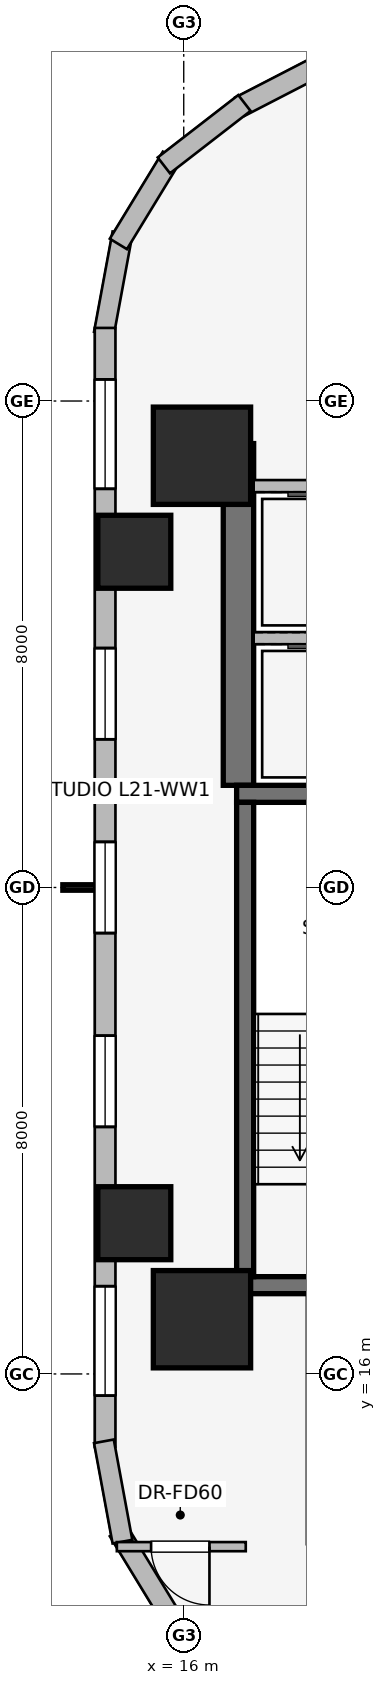
"""IFC4 building model, lengths in metres.
Left out: names, types, materials, properties, quantities, classifications, styles, units other than length and angle.
Written with IfcOpenShell. Run it as: python <this file> out.ifc"""

import sys

from ifc_helpers import new_model, si_unit, direction, frame, frame_2d, origin, origin_2d, place, context, subcontext, project, spatial, rectangle, extrude, element, fill, save


model = new_model("IFC4")
c1 = context("Model", 3, precision=1e-05, world=origin(), true_north=direction((0.0, 1.0)))
c2 = subcontext(c1, "Body", "Model", "MODEL_VIEW")
j1 = project(units=[si_unit("LENGTHUNIT", "METRE"), si_unit("PLANEANGLEUNIT", "RADIAN")], contexts=[c1])
p1 = place(None, origin())
s1 = spatial("IfcSite", under=j1, at=p1, CompositionType="ELEMENT")
p2 = place(p1, origin())
s2 = spatial("IfcBuilding", under=s1, at=p2, CompositionType="ELEMENT")
p3 = place(p2, frame((0.0, 0.0, 81.75)))
s3 = spatial("IfcBuildingStorey", under=s2, at=p3, CompositionType="ELEMENT", Elevation=81.75)
p4 = place(p3, frame((16.9, 25.68, 0.0), z_axis=(0.0, 0.0, 1.0), x_axis=(0.0, 1.0, 0.0)))
e1 = element("IfcWall", 1, at=p4, inside=s3, PredefinedType="SHEAR", context=c2, shape_type="SweptSolid", body=[
    extrude(rectangle(XDim=5.62, YDim=0.5, at=frame_2d((2.81, 0.0))), origin(), (0.0, 0.0, 1.0), 3.65),
])
for number, where, z_axis, x_axis in (
    (2, (16.87, 17.46, 0.0), (0.0, 0.0, 1.0), (1.0, 0.0, 0.0)),
    (3, (20.63, 25.54, 0.0), (0.0, 0.0, 1.0), (-1.0, 0.0, 0.0)),
):
    element("IfcWall", number, at=place(p3, frame(where, z_axis=z_axis, x_axis=x_axis)), inside=s3, PredefinedType="SHEAR", context=c2, shape_type="SweptSolid", body=[
        extrude(rectangle(XDim=3.76, YDim=0.28, at=frame_2d((1.88, 0.0))), origin(), (0.0, 0.0, 1.0), 3.65),
    ])
p5 = place(p3, frame((17.01, 25.4, 0.0), z_axis=(0.0, 0.0, 1.0), x_axis=(0.0, -1.0, 0.0)))
e4 = element("IfcWall", 4, at=p5, inside=s3, PredefinedType="SHEAR", context=c2, shape_type="SweptSolid", body=[
    extrude(rectangle(XDim=7.8, YDim=0.28, at=frame_2d((3.9, 0.0))), origin(), (0.0, 0.0, 1.0), 3.65),
])
for number, where, z_axis, x_axis in (
    (5, (16.3, 16.9, 0.0), (0.0, 0.0, 1.0), (1.0, 0.0, 0.0)),
    (6, (16.3, 31.1, 0.0), (0.0, 0.0, 1.0), (1.0, 0.0, 0.0)),
):
    element("IfcColumn", number, at=place(p3, frame(where, z_axis=z_axis, x_axis=x_axis)), inside=s3, PredefinedType="COLUMN", context=c2, shape_type="SweptSolid", body=[
        extrude(rectangle(XDim=1.6, YDim=1.6, at=origin_2d()), origin(), (0.0, 0.0, 1.0), 3.65),
    ])
for number, where, z_axis, x_axis in (
    (7, (15.187, 29.521, 0.0), (0.0, 0.0, 1.0), (1.0, 0.0, 0.0)),
    (8, (15.187, 18.479, 0.0), (0.0, 0.0, 1.0), (1.0, 0.0, 0.0)),
):
    element("IfcColumn", number, at=place(p3, frame(where, z_axis=z_axis, x_axis=x_axis)), inside=s3, PredefinedType="COLUMN", context=c2, shape_type="SweptSolid", body=[
        extrude(rectangle(XDim=1.2, YDim=1.2, at=origin_2d()), origin(), (0.0, 0.0, 1.0), 3.65),
    ])
p6 = place(p3, frame((16.924, 36.841, 0.0), z_axis=(0.0, 0.0, 1.0), x_axis=(0.888634413993, 0.458616264721, 0.0)))
e9 = element("IfcWall", 9, at=p6, inside=s3, PredefinedType="STANDARD", context=c2, shape_type="SweptSolid", body=[
    extrude(rectangle(XDim=20.531, YDim=0.34, at=frame_2d((10.266, 0.0))), origin(), (0.0, 0.0, 1.0), 2.684),
])
p7 = place(p6, frame((5.197, 0.0, 0.75)))
e10 = element("IfcOpeningElement", 10, at=p7, cuts=e9, PredefinedType="OPENING", context=c2, shape_type="SweptSolid", body=[
    extrude(rectangle(XDim=1.8, YDim=1.5, at=frame_2d((0.9, 0.75))), frame((0.0, 0.18, 0.0), z_axis=(0.0, -1.0, 0.0), x_axis=(1.0, 0.0, 0.0)), (0.0, 0.0, 1.0), 0.36),
])
p8 = place(p6, frame((7.698, 0.0, 0.75)))
e11 = element("IfcOpeningElement", 11, at=p8, cuts=e9, PredefinedType="OPENING", context=c2, shape_type="SweptSolid", body=[
    extrude(rectangle(XDim=1.8, YDim=1.5, at=frame_2d((0.9, 0.75))), frame((0.0, 0.18, 0.0), z_axis=(0.0, -1.0, 0.0), x_axis=(1.0, 0.0, 0.0)), (0.0, 0.0, 1.0), 0.36),
])
p9 = place(p6, frame((11.101, 0.0, 0.75)))
e12 = element("IfcOpeningElement", 12, at=p9, cuts=e9, PredefinedType="OPENING", context=c2, shape_type="SweptSolid", body=[
    extrude(rectangle(XDim=1.5, YDim=1.5, at=frame_2d((0.75, 0.75))), frame((0.0, 0.18, 0.0), z_axis=(0.0, -1.0, 0.0), x_axis=(1.0, 0.0, 0.0)), (0.0, 0.0, 1.0), 0.36),
])
p10 = place(p6, frame((13.657, 0.0, 0.75)))
e13 = element("IfcOpeningElement", 13, at=p10, cuts=e9, PredefinedType="OPENING", context=c2, shape_type="SweptSolid", body=[
    extrude(rectangle(XDim=1.5, YDim=1.5, at=frame_2d((0.75, 0.75))), frame((0.0, 0.18, 0.0), z_axis=(0.0, -1.0, 0.0), x_axis=(1.0, 0.0, 0.0)), (0.0, 0.0, 1.0), 0.36),
])
p11 = place(p6, frame((17.476, 0.0, 0.75)))
e14 = element("IfcOpeningElement", 14, at=p11, cuts=e9, PredefinedType="OPENING", context=c2, shape_type="SweptSolid", body=[
    extrude(rectangle(XDim=1.05, YDim=1.4, at=frame_2d((0.525, 0.7))), frame((0.0, 0.18, 0.0), z_axis=(0.0, -1.0, 0.0), x_axis=(1.0, 0.0, 0.0)), (0.0, 0.0, 1.0), 0.36),
])
p12 = place(p3, frame((14.687, 33.108, 0.0), z_axis=(0.0, 0.0, 1.0), x_axis=(0.181714143354, 0.983351397063, 0.0)))
e15 = element("IfcWall", 15, at=p12, inside=s3, PredefinedType="STANDARD", context=c2, shape_type="SweptSolid", body=[
    extrude(rectangle(XDim=1.678, YDim=0.33, at=frame_2d((0.839, 0.0))), origin(), (0.0, 0.0, 1.0), 3.39),
])
p13 = place(p3, frame((14.925, 34.583, 0.0), z_axis=(0.0, 0.0, 1.0), x_axis=(0.520584129191, 0.853810379671, 0.0)))
e16 = element("IfcWall", 16, at=p13, inside=s3, PredefinedType="STANDARD", context=c2, shape_type="SweptSolid", body=[
    extrude(rectangle(XDim=1.677, YDim=0.33, at=frame_2d((0.838, 0.0))), origin(), (0.0, 0.0, 1.0), 3.39),
])
p14 = place(p3, frame((15.673, 35.875, 0.0), z_axis=(0.0, 0.0, 1.0), x_axis=(0.790691856293, 0.61221433207, 0.0)))
e17 = element("IfcWall", 17, at=p14, inside=s3, PredefinedType="STANDARD", context=c2, shape_type="SweptSolid", body=[
    extrude(rectangle(XDim=1.676, YDim=0.33, at=frame_2d((0.838, 0.0))), origin(), (0.0, 0.0, 1.0), 3.39),
])
p15 = place(p3, frame((14.707, 14.798, 0.0), z_axis=(0.0, 0.0, 1.0), x_axis=(0.0, 1.0, 0.0)))
e18 = element("IfcWall", 18, at=p15, inside=s3, PredefinedType="STANDARD", context=c2, shape_type="SweptSolid", body=[
    extrude(rectangle(XDim=18.404, YDim=0.34, at=frame_2d((9.202, 0.0))), origin(), (0.0, 0.0, 1.0), 2.684),
])
p16 = place(p15, frame((0.845, 0.0, 0.75)))
e19 = element("IfcOpeningElement", 19, at=p16, cuts=e18, PredefinedType="OPENING", context=c2, shape_type="SweptSolid", body=[
    extrude(rectangle(XDim=1.8, YDim=1.5, at=frame_2d((0.9, 0.75))), frame((0.0, 0.18, 0.0), z_axis=(0.0, -1.0, 0.0), x_axis=(1.0, 0.0, 0.0)), (0.0, 0.0, 1.0), 0.36),
])
p17 = place(p15, frame((5.265, 0.0, 0.75)))
e20 = element("IfcOpeningElement", 20, at=p17, cuts=e18, PredefinedType="OPENING", context=c2, shape_type="SweptSolid", body=[
    extrude(rectangle(XDim=1.5, YDim=1.5, at=frame_2d((0.75, 0.75))), frame((0.0, 0.18, 0.0), z_axis=(0.0, -1.0, 0.0), x_axis=(1.0, 0.0, 0.0)), (0.0, 0.0, 1.0), 0.36),
])
p18 = place(p15, frame((8.452, 0.0, 0.75)))
e21 = element("IfcOpeningElement", 21, at=p18, cuts=e18, PredefinedType="OPENING", context=c2, shape_type="SweptSolid", body=[
    extrude(rectangle(XDim=1.5, YDim=1.5, at=frame_2d((0.75, 0.75))), frame((0.0, 0.18, 0.0), z_axis=(0.0, -1.0, 0.0), x_axis=(1.0, 0.0, 0.0)), (0.0, 0.0, 1.0), 0.36),
])
p19 = place(p15, frame((11.639, 0.0, 0.75)))
e22 = element("IfcOpeningElement", 22, at=p19, cuts=e18, PredefinedType="OPENING", context=c2, shape_type="SweptSolid", body=[
    extrude(rectangle(XDim=1.5, YDim=1.5, at=frame_2d((0.75, 0.75))), frame((0.0, 0.18, 0.0), z_axis=(0.0, -1.0, 0.0), x_axis=(1.0, 0.0, 0.0)), (0.0, 0.0, 1.0), 0.36),
])
p20 = place(p15, frame((15.758, 0.0, 0.75)))
e23 = element("IfcOpeningElement", 23, at=p20, cuts=e18, PredefinedType="OPENING", context=c2, shape_type="SweptSolid", body=[
    extrude(rectangle(XDim=1.8, YDim=1.5, at=frame_2d((0.9, 0.75))), frame((0.0, 0.18, 0.0), z_axis=(0.0, -1.0, 0.0), x_axis=(1.0, 0.0, 0.0)), (0.0, 0.0, 1.0), 0.36),
])
p21 = place(p3, frame((16.998, 11.099, 0.0), z_axis=(0.0, 0.0, 1.0), x_axis=(-0.790691856293, 0.61221433207, 0.0)))
e24 = element("IfcWall", 24, at=p21, inside=s3, PredefinedType="STANDARD", context=c2, shape_type="SweptSolid", body=[
    extrude(rectangle(XDim=1.676, YDim=0.33, at=frame_2d((0.838, 0.0))), origin(), (0.0, 0.0, 1.0), 3.39),
])
p22 = place(p3, frame((15.798, 11.985, 0.0), z_axis=(0.0, 0.0, 1.0), x_axis=(-0.520584129191, 0.853810379671, 0.0)))
e25 = element("IfcWall", 25, at=p22, inside=s3, PredefinedType="STANDARD", context=c2, shape_type="SweptSolid", body=[
    extrude(rectangle(XDim=1.677, YDim=0.33, at=frame_2d((0.838, 0.0))), origin(), (0.0, 0.0, 1.0), 3.39),
])
p23 = place(p3, frame((14.992, 13.242, 0.0), z_axis=(0.0, 0.0, 1.0), x_axis=(-0.181714143354, 0.983351397063, 0.0)))
e26 = element("IfcWall", 26, at=p23, inside=s3, PredefinedType="STANDARD", context=c2, shape_type="SweptSolid", body=[
    extrude(rectangle(XDim=1.678, YDim=0.33, at=frame_2d((0.839, 0.0))), origin(), (0.0, 0.0, 1.0), 3.39),
])
p24 = place(p3, frame((17.15, 28.1, 0.0), z_axis=(0.0, 0.0, 1.0), x_axis=(1.0, 0.0, 0.0)))
e27 = element("IfcWall", 27, at=p24, inside=s3, PredefinedType="PARTITIONING", context=c2, shape_type="SweptSolid", body=[
    extrude(rectangle(XDim=2.5, YDim=0.2, at=frame_2d((1.25, 0.0))), origin(), (0.0, 0.0, 1.0), 3.39),
])
p25 = place(p3, frame((19.65, 30.6, 0.0), z_axis=(0.0, 0.0, 1.0), x_axis=(-1.0, 0.0, 0.0)))
e28 = element("IfcWall", 28, at=p25, inside=s3, PredefinedType="PARTITIONING", context=c2, shape_type="SweptSolid", body=[
    extrude(rectangle(XDim=2.5, YDim=0.2, at=frame_2d((1.25, 0.0))), origin(), (0.0, 0.0, 1.0), 2.29),
])
p26 = place(p3, frame((17.02, 13.16, 0.0), z_axis=(0.0, 0.0, 1.0), x_axis=(-1.0, 0.0, 0.0)))
e29 = element("IfcWall", 29, at=p26, inside=s3, PredefinedType="PARTITIONING", context=c2, shape_type="SweptSolid", body=[
    extrude(rectangle(XDim=2.12, YDim=0.15, at=frame_2d((1.06, 0.0))), origin(), (0.0, 0.0, 1.0), 3.39),
])
p27 = place(p26, frame((0.597, 0.0, 0.0)))
e30 = element("IfcOpeningElement", 30, at=p27, cuts=e29, PredefinedType="OPENING", context=c2, shape_type="SweptSolid", body=[
    extrude(rectangle(XDim=0.96, YDim=2.0, at=frame_2d((0.48, 1.0))), frame((0.0, 0.085, 0.0), z_axis=(0.0, -1.0, 0.0), x_axis=(1.0, 0.0, 0.0)), (0.0, 0.0, 1.0), 0.17),
])
p28 = place(p16, origin())
e31 = element("IfcWindow", 31, at=p28, inside=s3, PartitioningType="SINGLE_PANEL", PredefinedType="WINDOW", context=c2, shape_type="SweptSolid", body=[
    extrude(rectangle(XDim=1.8, YDim=1.5, at=frame_2d((0.9, 0.75))), frame((0.0, 0.03, 0.0), z_axis=(0.0, -1.0, 0.0), x_axis=(1.0, 0.0, 0.0)), (0.0, 0.0, 1.0), 0.06),
])
fill(e19, e31)
p29 = place(p17, origin())
e32 = element("IfcWindow", 32, at=p29, inside=s3, PartitioningType="SINGLE_PANEL", PredefinedType="WINDOW", context=c2, shape_type="SweptSolid", body=[
    extrude(rectangle(XDim=1.5, YDim=1.5, at=frame_2d((0.75, 0.75))), frame((0.0, 0.03, 0.0), z_axis=(0.0, -1.0, 0.0), x_axis=(1.0, 0.0, 0.0)), (0.0, 0.0, 1.0), 0.06),
])
fill(e20, e32)
p30 = place(p18, origin())
e33 = element("IfcWindow", 33, at=p30, inside=s3, PartitioningType="SINGLE_PANEL", PredefinedType="WINDOW", context=c2, shape_type="SweptSolid", body=[
    extrude(rectangle(XDim=1.5, YDim=1.5, at=frame_2d((0.75, 0.75))), frame((0.0, 0.03, 0.0), z_axis=(0.0, -1.0, 0.0), x_axis=(1.0, 0.0, 0.0)), (0.0, 0.0, 1.0), 0.06),
])
fill(e21, e33)
p31 = place(p19, origin())
e34 = element("IfcWindow", 34, at=p31, inside=s3, PartitioningType="SINGLE_PANEL", PredefinedType="WINDOW", context=c2, shape_type="SweptSolid", body=[
    extrude(rectangle(XDim=1.5, YDim=1.5, at=frame_2d((0.75, 0.75))), frame((0.0, 0.03, 0.0), z_axis=(0.0, -1.0, 0.0), x_axis=(1.0, 0.0, 0.0)), (0.0, 0.0, 1.0), 0.06),
])
fill(e22, e34)
p32 = place(p20, origin())
e35 = element("IfcWindow", 35, at=p32, inside=s3, PartitioningType="SINGLE_PANEL", PredefinedType="WINDOW", context=c2, shape_type="SweptSolid", body=[
    extrude(rectangle(XDim=1.8, YDim=1.5, at=frame_2d((0.9, 0.75))), frame((0.0, 0.03, 0.0), z_axis=(0.0, -1.0, 0.0), x_axis=(1.0, 0.0, 0.0)), (0.0, 0.0, 1.0), 0.06),
])
fill(e23, e35)
p33 = place(p27, origin())
e36 = element("IfcDoor", 36, at=p33, inside=s3, OperationType="SINGLE_SWING_LEFT", PredefinedType="DOOR", context=c2, shape_type="SweptSolid", body=[
    extrude(rectangle(XDim=0.96, YDim=2.0, at=frame_2d((0.48, 1.0))), frame((0.0, 0.025, 0.0), z_axis=(0.0, -1.0, 0.0), x_axis=(1.0, 0.0, 0.0)), (0.0, 0.0, 1.0), 0.05),
])
fill(e30, e36)
save(model, sys.argv[1])
